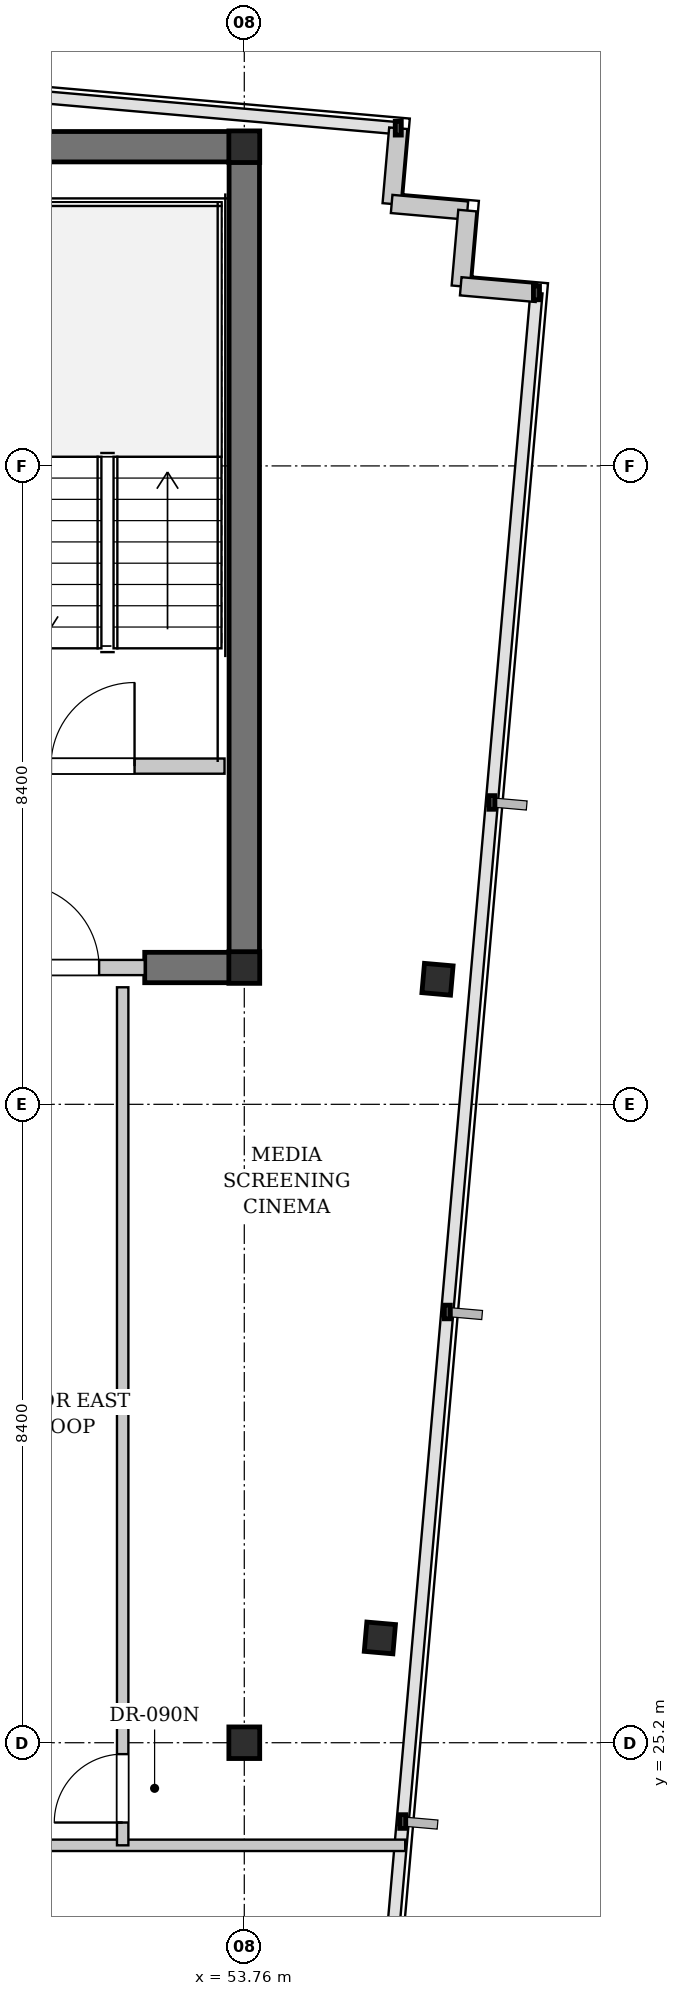
"""IFC4 building model, lengths in metres.
Left out: names, types, materials, properties, quantities, classifications, styles, units other than length and angle.
Written with IfcOpenShell. Run it as: python <this file> out.ifc"""

import sys

from ifc_helpers import new_model, si_unit, direction, frame, frame_2d, origin, origin_2d, place, context, subcontext, project, spatial, rectangle, i_section, extrude, element, fill, save


model = new_model("IFC4")
c1 = context("Model", 3, precision=1e-05, world=origin(), true_north=direction((0.0, 1.0)))
c2 = subcontext(c1, "Body", "Model", "MODEL_VIEW")
j1 = project(units=[si_unit("LENGTHUNIT", "METRE"), si_unit("PLANEANGLEUNIT", "RADIAN")], contexts=[c1])
p1 = place(None, origin())
s1 = spatial("IfcSite", under=j1, at=p1, CompositionType="ELEMENT")
p2 = place(p1, origin())
s2 = spatial("IfcBuilding", under=s1, at=p2, CompositionType="ELEMENT")
p3 = place(p2, frame((0.0, 0.0, 282.9)))
s3 = spatial("IfcBuildingStorey", under=s2, at=p3, CompositionType="ELEMENT", Elevation=282.9)
p4 = place(p3, frame((22.84, 46.2, 0.0), z_axis=(0.0, 0.0, 1.0), x_axis=(1.0, 0.0, 0.0)))
e1 = element("IfcWall", 1, at=p4, inside=s3, PredefinedType="SHEAR", context=c2, shape_type="SweptSolid", body=[
    extrude(rectangle(XDim=31.12, YDim=0.4, at=frame_2d((15.56, 0.0))), origin(), (0.0, 0.0, 1.0), 3.18),
])
p5 = place(p3, frame((52.45, 35.4, 0.0), z_axis=(0.0, 0.0, 1.0), x_axis=(1.0, 0.0, 0.0)))
e2 = element("IfcWall", 2, at=p5, inside=s3, PredefinedType="SHEAR", context=c2, shape_type="SweptSolid", body=[
    extrude(rectangle(XDim=1.51, YDim=0.4, at=frame_2d((0.755, 0.0))), origin(), (0.0, 0.0, 1.0), 3.18),
])
p6 = place(p3, frame((53.76, 35.6, 0.0), z_axis=(0.0, 0.0, 1.0), x_axis=(0.0, 1.0, 0.0)))
e3 = element("IfcWall", 3, at=p6, inside=s3, PredefinedType="SHEAR", context=c2, shape_type="SweptSolid", body=[
    extrude(rectangle(XDim=10.4, YDim=0.4, at=frame_2d((5.2, 0.0))), origin(), (0.0, 0.0, 1.0), 3.18),
])
for number, where, z_axis, x_axis in (
    (4, (53.76, 35.4, 0.0), (0.0, 0.0, 1.0), (1.0, 0.0, 0.0)),
    (5, (53.76, 46.2, 0.0), (0.0, 0.0, 1.0), (1.0, 0.0, 0.0)),
    (6, (53.76, 25.2, 0.0), (0.0, 0.0, 1.0), (1.0, 0.0, 0.0)),
):
    element("IfcColumn", number, at=place(p3, frame(where, z_axis=z_axis, x_axis=x_axis)), inside=s3, PredefinedType="COLUMN", context=c2, shape_type="SweptSolid", body=[
        extrude(i_section(OverallWidth=0.406, OverallDepth=0.416, WebThickness=0.03, FlangeThickness=0.048, FilletRadius=0.015, at=origin_2d()), origin(), (0.0, 0.0, 1.0), 3.4),
    ])
for number, where, z_axis, x_axis in (
    (7, (55.544, 26.579, 0.0), (0.0, 0.0, 1.0), (0.996, -0.087, 0.0)),
    (8, (56.302, 35.246, 0.0), (0.0, 0.0, 1.0), (0.996, -0.087, 0.0)),
):
    element("IfcColumn", number, at=place(p3, frame(where, z_axis=z_axis, x_axis=x_axis)), inside=s3, PredefinedType="COLUMN", context=c2, shape_type="SweptSolid", body=[
        extrude(i_section(OverallWidth=0.378, OverallDepth=0.387, WebThickness=0.021, FlangeThickness=0.033, FilletRadius=0.015, at=origin_2d()), origin(), (0.0, 0.0, 1.0), 3.4),
    ])
for number, where, z_axis, x_axis in (
    (9, (55.786, 46.443, 0.0), (0.0, 0.0, 1.0), (-0.087, -0.996, 0.0)),
    (10, (55.699, 45.447, 0.0), (0.0, 0.0, 1.0), (0.996, -0.087, 0.0)),
    (11, (56.695, 45.36, 0.0), (0.0, 0.0, 1.0), (-0.087, -0.996, 0.0)),
    (12, (56.608, 44.364, 0.0), (0.0, 0.0, 1.0), (0.996, -0.087, 0.0)),
):
    element("IfcWall", number, at=place(p3, frame(where, z_axis=z_axis, x_axis=x_axis)), inside=s3, PredefinedType="SOLIDWALL", context=c2, shape_type="SweptSolid", body=[
        extrude(rectangle(XDim=1.0, YDim=0.24, at=frame_2d((0.5, 0.0))), origin(), (0.0, 0.0, 1.0), 3.18),
    ])
p7 = place(p3, frame((49.78, 38.05, 0.0), z_axis=(0.0, 0.0, 1.0), x_axis=(1.0, 0.0, 0.0)))
e13 = element("IfcWall", 13, at=p7, inside=s3, PredefinedType="PARTITIONING", context=c2, shape_type="SweptSolid", body=[
    extrude(rectangle(XDim=3.72, YDim=0.2, at=frame_2d((1.86, 0.0))), origin(), (0.0, 0.0, 1.0), 3.18),
])
p8 = place(p7, frame((1.436, 0.0, 0.0)))
e14 = element("IfcOpeningElement", 14, at=p8, cuts=e13, PredefinedType="OPENING", context=c2, shape_type="SweptSolid", body=[
    extrude(rectangle(XDim=1.1, YDim=2.15, at=frame_2d((0.55, 1.075))), frame((0.0, 0.11, 0.0), z_axis=(0.0, -1.0, 0.0), x_axis=(1.0, 0.0, 0.0)), (0.0, 0.0, 1.0), 0.22),
])
p9 = place(p3, frame((50.15, 35.4, 0.0), z_axis=(0.0, 0.0, 1.0), x_axis=(1.0, 0.0, 0.0)))
e15 = element("IfcWall", 15, at=p9, inside=s3, PredefinedType="PARTITIONING", context=c2, shape_type="SweptSolid", body=[
    extrude(rectangle(XDim=2.3, YDim=0.2, at=frame_2d((1.15, 0.0))), origin(), (0.0, 0.0, 1.0), 2.575),
])
p10 = place(p9, frame((0.6, 0.0, 0.0)))
e16 = element("IfcOpeningElement", 16, at=p10, cuts=e15, PredefinedType="OPENING", context=c2, shape_type="SweptSolid", body=[
    extrude(rectangle(XDim=1.1, YDim=2.15, at=frame_2d((0.55, 1.075))), frame((0.0, 0.11, 0.0), z_axis=(0.0, -1.0, 0.0), x_axis=(1.0, 0.0, 0.0)), (0.0, 0.0, 1.0), 0.22),
])
p11 = place(p3, frame((35.62, 23.85, 0.0), z_axis=(0.0, 0.0, 1.0), x_axis=(1.0, 0.0, 0.0)))
e17 = element("IfcWall", 17, at=p11, inside=s3, PredefinedType="PARTITIONING", context=c2, shape_type="SweptSolid", body=[
    extrude(rectangle(XDim=20.257, YDim=0.15, at=frame_2d((10.128, 0.0))), origin(), (0.0, 0.0, 1.0), 3.18),
])
p12 = place(p11, frame((4.365, 0.0, 0.0)))
e18 = element("IfcOpeningElement", 18, at=p12, cuts=e17, PredefinedType="OPENING", context=c2, shape_type="SweptSolid", body=[
    extrude(rectangle(XDim=0.95, YDim=2.15, at=frame_2d((0.475, 1.075))), frame((0.0, 0.085, 0.0), z_axis=(0.0, -1.0, 0.0), x_axis=(1.0, 0.0, 0.0)), (0.0, 0.0, 1.0), 0.17),
])
p13 = place(p11, frame((12.086, 0.0, 0.0)))
e19 = element("IfcOpeningElement", 19, at=p13, cuts=e17, PredefinedType="OPENING", context=c2, shape_type="SweptSolid", body=[
    extrude(rectangle(XDim=0.95, YDim=2.15, at=frame_2d((0.475, 1.075))), frame((0.0, 0.085, 0.0), z_axis=(0.0, -1.0, 0.0), x_axis=(1.0, 0.0, 0.0)), (0.0, 0.0, 1.0), 0.17),
])
p14 = place(p3, frame((52.16, 23.85, 0.0), z_axis=(0.0, 0.0, 1.0), x_axis=(0.0, 1.0, 0.0)))
e20 = element("IfcWall", 20, at=p14, inside=s3, PredefinedType="PARTITIONING", context=c2, shape_type="SweptSolid", body=[
    extrude(rectangle(XDim=11.29, YDim=0.15, at=frame_2d((5.645, 0.0))), origin(), (0.0, 0.0, 1.0), 3.18),
])
p15 = place(p14, frame((0.3, 0.0, 0.0)))
e21 = element("IfcOpeningElement", 21, at=p15, cuts=e20, PredefinedType="OPENING", context=c2, shape_type="SweptSolid", body=[
    extrude(rectangle(XDim=0.9, YDim=2.15, at=frame_2d((0.45, 1.075))), frame((0.0, 0.085, 0.0), z_axis=(0.0, -1.0, 0.0), x_axis=(1.0, 0.0, 0.0)), (0.0, 0.0, 1.0), 0.17),
])
p16 = place(p8, origin())
e22 = element("IfcDoor", 22, at=p16, inside=s3, OperationType="SINGLE_SWING_RIGHT", PredefinedType="DOOR", context=c2, shape_type="SweptSolid", body=[
    extrude(rectangle(XDim=1.1, YDim=2.15, at=frame_2d((0.55, 1.075))), frame((0.0, 0.025, 0.0), z_axis=(0.0, -1.0, 0.0), x_axis=(1.0, 0.0, 0.0)), (0.0, 0.0, 1.0), 0.05),
])
fill(e14, e22)
p17 = place(p10, origin())
e23 = element("IfcDoor", 23, at=p17, inside=s3, OperationType="SINGLE_SWING_LEFT", PredefinedType="DOOR", context=c2, shape_type="SweptSolid", body=[
    extrude(rectangle(XDim=1.1, YDim=2.15, at=frame_2d((0.55, 1.075))), frame((0.0, 0.025, 0.0), z_axis=(0.0, -1.0, 0.0), x_axis=(1.0, 0.0, 0.0)), (0.0, 0.0, 1.0), 0.05),
])
fill(e16, e23)
p18 = place(p15, origin())
e24 = element("IfcDoor", 24, at=p18, inside=s3, OperationType="SINGLE_SWING_LEFT", PredefinedType="DOOR", context=c2, shape_type="SweptSolid", body=[
    extrude(rectangle(XDim=0.9, YDim=2.15, at=frame_2d((0.45, 1.075))), frame((0.0, 0.025, 0.0), z_axis=(0.0, -1.0, 0.0), x_axis=(1.0, 0.0, 0.0)), (0.0, 0.0, 1.0), 0.05),
])
fill(e21, e24)
save(model, sys.argv[1])
